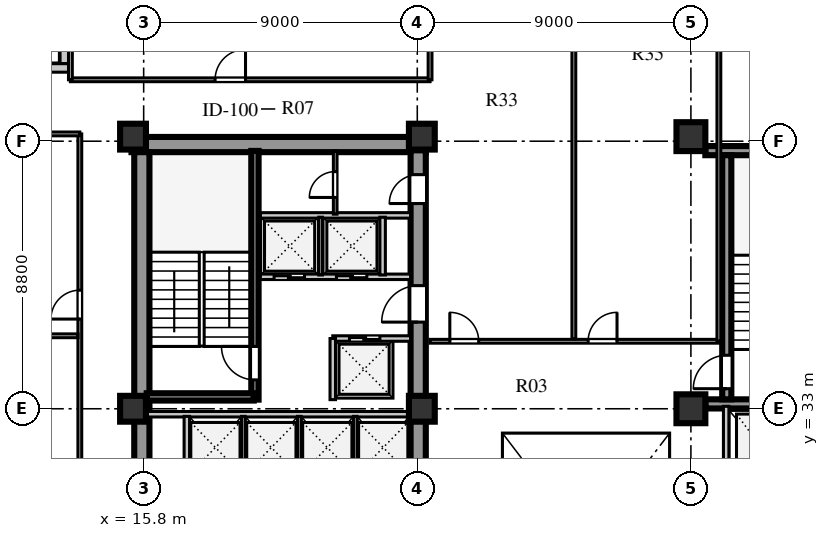
"""IFC4 building model, lengths in metres.
Left out: names, types, materials, properties, quantities, classifications, styles, units other than length and angle.
Written with IfcOpenShell. Run it as: python <this file> out.ifc"""

import sys

from ifc_helpers import new_model, si_unit, direction, frame, frame_2d, origin, origin_2d, place, context, subcontext, project, spatial, rectangle, extrude, element, fill, save


model = new_model("IFC4")
c1 = context("Model", 3, precision=1e-05, world=origin(), true_north=direction((0.0, 1.0)))
c2 = subcontext(c1, "Body", "Model", "MODEL_VIEW")
j1 = project(units=[si_unit("LENGTHUNIT", "METRE"), si_unit("PLANEANGLEUNIT", "RADIAN")], contexts=[c1])
p1 = place(None, origin())
s1 = spatial("IfcSite", under=j1, at=p1, CompositionType="ELEMENT")
p2 = place(p1, origin())
s2 = spatial("IfcBuilding", under=s1, at=p2, CompositionType="ELEMENT")
p3 = place(p2, frame((0.0, 0.0, 165.6)))
s3 = spatial("IfcBuildingStorey", under=s2, at=p3, CompositionType="ELEMENT", Elevation=165.6)
p4 = place(p3, frame((15.4, 41.69, 0.0), z_axis=(0.0, 0.0, 1.0), x_axis=(1.0, 0.0, 0.0)))
e1 = element("IfcWall", 1, at=p4, inside=s3, PredefinedType="SHEAR", context=c2, shape_type="SweptSolid", body=[
    extrude(rectangle(XDim=9.68, YDim=0.5, at=frame_2d((4.84, 0.0))), origin(), (0.0, 0.0, 1.0), 3.6),
])
p5 = place(p3, frame((15.74, 15.81, 0.0), z_axis=(0.0, 0.0, 1.0), x_axis=(0.0, 1.0, 0.0)))
e2 = element("IfcWall", 2, at=p5, inside=s3, PredefinedType="SHEAR", context=c2, shape_type="SweptSolid", body=[
    extrude(rectangle(XDim=25.63, YDim=0.5, at=frame_2d((12.815, 0.0))), origin(), (0.0, 0.0, 1.0), 3.6),
])
p6 = place(p3, frame((24.83, 15.74, 0.0), z_axis=(0.0, 0.0, 1.0), x_axis=(0.0, 1.0, 0.0)))
e3 = element("IfcWall", 3, at=p6, inside=s3, PredefinedType="SHEAR", context=c2, shape_type="SweptSolid", body=[
    extrude(rectangle(XDim=25.76, YDim=0.5, at=frame_2d((12.88, 0.0))), origin(), (0.0, 0.0, 1.0), 3.6),
])
p7 = place(p6, frame((1.61, 0.0, 0.0)))
e4 = element("IfcOpeningElement", 4, at=p7, cuts=e3, PredefinedType="OPENING", context=c2, shape_type="SweptSolid", body=[
    extrude(rectangle(XDim=1.2, YDim=2.1, at=frame_2d((0.6, 1.05))), frame((0.0, 0.26, 0.0), z_axis=(0.0, -1.0, 0.0), x_axis=(1.0, 0.0, 0.0)), (0.0, 0.0, 1.0), 0.52),
])
p8 = place(p6, frame((6.78, 0.0, 0.0)))
e5 = element("IfcOpeningElement", 5, at=p8, cuts=e3, PredefinedType="OPENING", context=c2, shape_type="SweptSolid", body=[
    extrude(rectangle(XDim=0.85, YDim=2.06, at=frame_2d((0.425, 1.03))), frame((0.0, 0.26, 0.0), z_axis=(0.0, -1.0, 0.0), x_axis=(1.0, 0.0, 0.0)), (0.0, 0.0, 1.0), 0.52),
])
p9 = place(p6, frame((12.11, 0.0, 0.0)))
e6 = element("IfcOpeningElement", 6, at=p9, cuts=e3, PredefinedType="OPENING", context=c2, shape_type="SweptSolid", body=[
    extrude(rectangle(XDim=1.5, YDim=2.12, at=frame_2d((0.75, 1.06))), frame((0.0, 0.26, 0.0), z_axis=(0.0, -1.0, 0.0), x_axis=(1.0, 0.0, 0.0)), (0.0, 0.0, 1.0), 0.52),
])
p10 = place(p6, frame((20.11, 0.0, 0.0)))
e7 = element("IfcOpeningElement", 7, at=p10, cuts=e3, PredefinedType="OPENING", context=c2, shape_type="SweptSolid", body=[
    extrude(rectangle(XDim=1.2, YDim=2.12, at=frame_2d((0.6, 1.06))), frame((0.0, 0.26, 0.0), z_axis=(0.0, -1.0, 0.0), x_axis=(1.0, 0.0, 0.0)), (0.0, 0.0, 1.0), 0.52),
])
p11 = place(p6, frame((24.01, 0.0, 0.0)))
e8 = element("IfcOpeningElement", 8, at=p11, cuts=e3, PredefinedType="OPENING", context=c2, shape_type="SweptSolid", body=[
    extrude(rectangle(XDim=0.95, YDim=2.1, at=frame_2d((0.475, 1.05))), frame((0.0, 0.26, 0.0), z_axis=(0.0, -1.0, 0.0), x_axis=(1.0, 0.0, 0.0)), (0.0, 0.0, 1.0), 0.52),
])
for number, where, z_axis, x_axis in (
    (9, (34.275, 33.16, 0.0), (0.0, 0.0, 1.0), (1.0, 0.0, 0.0)),
    (10, (34.275, 41.49, 0.0), (0.0, 0.0, 1.0), (1.0, 0.0, 0.0)),
):
    element("IfcWall", number, at=place(p3, frame(where, z_axis=z_axis, x_axis=x_axis)), inside=s3, PredefinedType="SHEAR", context=c2, shape_type="SweptSolid", body=[
        extrude(rectangle(XDim=4.595, YDim=0.3, at=frame_2d((2.298, 0.0))), origin(), (0.0, 0.0, 1.0), 3.6),
    ])
p12 = place(p3, frame((34.98, 33.31, 0.0), z_axis=(0.0, 0.0, 1.0), x_axis=(0.0, 1.0, 0.0)))
e11 = element("IfcWall", 11, at=p12, inside=s3, PredefinedType="SHEAR", context=c2, shape_type="SweptSolid", body=[
    extrude(rectangle(XDim=8.03, YDim=0.3, at=frame_2d((4.015, 0.0))), origin(), (0.0, 0.0, 1.0), 3.6),
])
p13 = place(p12, frame((0.35, 0.0, 0.0)))
e12 = element("IfcOpeningElement", 12, at=p13, cuts=e11, PredefinedType="OPENING", context=c2, shape_type="SweptSolid", body=[
    extrude(rectangle(XDim=1.1, YDim=2.1, at=frame_2d((0.55, 1.05))), frame((0.0, 0.16, 0.0), z_axis=(0.0, -1.0, 0.0), x_axis=(1.0, 0.0, 0.0)), (0.0, 0.0, 1.0), 0.32),
])
for number, where, z_axis, x_axis in (
    (13, (15.45, 33.0, 0.0), (0.0, 0.0, 1.0), (1.0, 0.0, 0.0)),
    (14, (15.45, 41.95, 0.0), (0.0, 0.0, 1.0), (1.0, 0.0, 0.0)),
    (15, (24.95, 33.0, 0.0), (0.0, 0.0, 1.0), (1.0, 0.0, 0.0)),
    (16, (24.95, 41.95, 0.0), (0.0, 0.0, 1.0), (1.0, 0.0, 0.0)),
):
    element("IfcColumn", number, at=place(p3, frame(where, z_axis=z_axis, x_axis=x_axis)), inside=s3, PredefinedType="COLUMN", context=c2, shape_type="SweptSolid", body=[
        extrude(rectangle(XDim=0.85, YDim=0.85, at=origin_2d()), origin(), (0.0, 0.0, 1.0), 3.6),
    ])
for number, where, z_axis, x_axis in (
    (17, (33.8, 33.0, 0.0), (0.0, 0.0, 1.0), (1.0, 0.0, 0.0)),
    (18, (33.8, 41.95, 0.0), (0.0, 0.0, 1.0), (1.0, 0.0, 0.0)),
):
    element("IfcColumn", number, at=place(p3, frame(where, z_axis=z_axis, x_axis=x_axis)), inside=s3, PredefinedType="COLUMN", context=c2, shape_type="SweptSolid", body=[
        extrude(rectangle(XDim=0.95, YDim=0.95, at=origin_2d()), origin(), (0.0, 0.0, 1.0), 3.6),
    ])
p14 = place(p3, frame((13.19, 49.32, 0.0), z_axis=(0.0, 0.0, 1.0), x_axis=(0.0, -1.0, 0.0)))
e19 = element("IfcWall", 19, at=p14, inside=s3, PredefinedType="STANDARD", context=c2, shape_type="SweptSolid", body=[
    extrude(rectangle(XDim=4.97, YDim=0.28, at=frame_2d((2.485, 0.0))), origin(), (0.0, 0.0, 1.0), 3.6),
])
p15 = place(p3, frame((13.33, 44.21, 0.0), z_axis=(0.0, 0.0, 1.0), x_axis=(-1.0, 0.0, 0.0)))
e20 = element("IfcWall", 20, at=p15, inside=s3, PredefinedType="STANDARD", context=c2, shape_type="SweptSolid", body=[
    extrude(rectangle(XDim=5.53, YDim=0.28, at=frame_2d((2.765, 0.0))), origin(), (0.0, 0.0, 1.0), 3.6),
])
p16 = place(p3, frame((15.9, 32.82, 0.0), z_axis=(0.0, 0.0, 1.0), x_axis=(1.0, 0.0, 0.0)))
e21 = element("IfcWall", 21, at=p16, inside=s3, PredefinedType="SOLIDWALL", context=c2, shape_type="SweptSolid", body=[
    extrude(rectangle(XDim=8.68, YDim=0.18, at=frame_2d((4.34, 0.0))), origin(), (0.0, 0.0, 1.0), 2.95),
])
p17 = place(p3, frame((17.22, 30.7, 0.0), z_axis=(0.0, 0.0, 1.0), x_axis=(0.0, 1.0, 0.0)))
e22 = element("IfcWall", 22, at=p17, inside=s3, PredefinedType="SOLIDWALL", context=c2, shape_type="SweptSolid", body=[
    extrude(rectangle(XDim=2.05, YDim=0.18, at=frame_2d((1.025, 0.0))), origin(), (0.0, 0.0, 1.0), 3.6),
])
for number, where, z_axis, x_axis in (
    (23, (19.08, 30.7, 0.0), (0.0, 0.0, 1.0), (0.0, 1.0, 0.0)),
    (24, (20.92, 30.7, 0.0), (0.0, 0.0, 1.0), (0.0, 1.0, 0.0)),
    (25, (22.76, 30.7, 0.0), (0.0, 0.0, 1.0), (0.0, 1.0, 0.0)),
):
    element("IfcWall", number, at=place(p3, frame(where, z_axis=z_axis, x_axis=x_axis)), inside=s3, PredefinedType="PARTITIONING", context=c2, shape_type="SweptSolid", body=[
        extrude(rectangle(XDim=2.05, YDim=0.12, at=frame_2d((1.025, 0.0))), origin(), (0.0, 0.0, 1.0), 3.6),
    ])
p18 = place(p3, frame((19.46, 33.3, 0.0), z_axis=(0.0, 0.0, 1.0), x_axis=(0.0, 1.0, 0.0)))
e26 = element("IfcWall", 26, at=p18, inside=s3, PredefinedType="SHEAR", context=c2, shape_type="SweptSolid", body=[
    extrude(rectangle(XDim=8.18, YDim=0.24, at=frame_2d((4.09, 0.0))), origin(), (0.0, 0.0, 1.0), 3.85),
])
p19 = place(p18, frame((0.65, 0.0, 0.0)))
e27 = element("IfcOpeningElement", 27, at=p19, cuts=e26, PredefinedType="OPENING", context=c2, shape_type="SweptSolid", body=[
    extrude(rectangle(XDim=1.1, YDim=2.1, at=frame_2d((0.55, 1.05))), frame((0.0, 0.13, 0.0), z_axis=(0.0, -1.0, 0.0), x_axis=(1.0, 0.0, 0.0)), (0.0, 0.0, 1.0), 0.26),
])
p20 = place(p3, frame((15.9, 33.39, 0.0), z_axis=(0.0, 0.0, 1.0), x_axis=(1.0, 0.0, 0.0)))
e28 = element("IfcWall", 28, at=p20, inside=s3, PredefinedType="SHEAR", context=c2, shape_type="SweptSolid", body=[
    extrude(rectangle(XDim=3.52, YDim=0.24, at=frame_2d((1.76, 0.0))), origin(), (0.0, 0.0, 1.0), 3.85),
])
p21 = place(p3, frame((22.02, 35.31, 0.0), z_axis=(0.0, 0.0, 1.0), x_axis=(1.0, 0.0, 0.0)))
e29 = element("IfcWall", 29, at=p21, inside=s3, PredefinedType="SOLIDWALL", context=c2, shape_type="SweptSolid", body=[
    extrude(rectangle(XDim=2.56, YDim=0.18, at=frame_2d((1.28, 0.0))), origin(), (0.0, 0.0, 1.0), 3.6),
])
p22 = place(p21, frame((0.55, 0.0, 0.0)))
e30 = element("IfcOpeningElement", 30, at=p22, cuts=e29, PredefinedType="OPENING", context=c2, shape_type="SweptSolid", body=[
    extrude(rectangle(XDim=1.0, YDim=2.1, at=frame_2d((0.5, 1.05))), frame((0.0, 0.1, 0.0), z_axis=(0.0, -1.0, 0.0), x_axis=(1.0, 0.0, 0.0)), (0.0, 0.0, 1.0), 0.2),
])
p23 = place(p3, frame((22.02, 33.3, 0.0), z_axis=(0.0, 0.0, 1.0), x_axis=(0.0, 1.0, 0.0)))
e31 = element("IfcWall", 31, at=p23, inside=s3, PredefinedType="SOLIDWALL", context=c2, shape_type="SweptSolid", body=[
    extrude(rectangle(XDim=2.01, YDim=0.18, at=frame_2d((1.005, 0.0))), origin(), (0.0, 0.0, 1.0), 3.6),
])
p24 = place(p3, frame((19.64, 37.34, 0.0), z_axis=(0.0, 0.0, 1.0), x_axis=(1.0, 0.0, 0.0)))
e32 = element("IfcWall", 32, at=p24, inside=s3, PredefinedType="SOLIDWALL", context=c2, shape_type="SweptSolid", body=[
    extrude(rectangle(XDim=4.94, YDim=0.18, at=frame_2d((2.47, 0.0))), origin(), (0.0, 0.0, 1.0), 3.6),
])
p25 = place(p24, frame((0.45, 0.0, 0.0)))
e33 = element("IfcOpeningElement", 33, at=p25, cuts=e32, PredefinedType="OPENING", context=c2, shape_type="SweptSolid", body=[
    extrude(rectangle(XDim=1.0, YDim=2.1, at=frame_2d((0.5, 1.05))), frame((0.0, 0.1, 0.0), z_axis=(0.0, -1.0, 0.0), x_axis=(1.0, 0.0, 0.0)), (0.0, 0.0, 1.0), 0.2),
])
p26 = place(p24, frame((2.5, 0.0, 0.0)))
e34 = element("IfcOpeningElement", 34, at=p26, cuts=e32, PredefinedType="OPENING", context=c2, shape_type="SweptSolid", body=[
    extrude(rectangle(XDim=1.0, YDim=2.1, at=frame_2d((0.5, 1.05))), frame((0.0, 0.1, 0.0), z_axis=(0.0, -1.0, 0.0), x_axis=(1.0, 0.0, 0.0)), (0.0, 0.0, 1.0), 0.2),
])
p27 = place(p3, frame((19.64, 39.36, 0.0), z_axis=(0.0, 0.0, 1.0), x_axis=(1.0, 0.0, 0.0)))
e35 = element("IfcWall", 35, at=p27, inside=s3, PredefinedType="SOLIDWALL", context=c2, shape_type="SweptSolid", body=[
    extrude(rectangle(XDim=4.94, YDim=0.18, at=frame_2d((2.47, 0.0))), origin(), (0.0, 0.0, 1.0), 3.6),
])
p28 = place(p3, frame((21.62, 37.4, 0.0), z_axis=(0.0, 0.0, 1.0), x_axis=(0.0, 1.0, 0.0)))
e36 = element("IfcWall", 36, at=p28, inside=s3, PredefinedType="PARTITIONING", context=c2, shape_type="SweptSolid", body=[
    extrude(rectangle(XDim=1.9, YDim=0.12, at=frame_2d((0.95, 0.0))), origin(), (0.0, 0.0, 1.0), 3.6),
])
p29 = place(p3, frame((23.66, 37.4, 0.0), z_axis=(0.0, 0.0, 1.0), x_axis=(0.0, 1.0, 0.0)))
e37 = element("IfcWall", 37, at=p29, inside=s3, PredefinedType="SOLIDWALL", context=c2, shape_type="SweptSolid", body=[
    extrude(rectangle(XDim=1.9, YDim=0.18, at=frame_2d((0.95, 0.0))), origin(), (0.0, 0.0, 1.0), 3.6),
])
p30 = place(p3, frame((22.1, 39.4, 0.0), z_axis=(0.0, 0.0, 1.0), x_axis=(0.0, 1.0, 0.0)))
e38 = element("IfcWall", 38, at=p30, inside=s3, PredefinedType="PARTITIONING", context=c2, shape_type="SweptSolid", body=[
    extrude(rectangle(XDim=2.08, YDim=0.12, at=frame_2d((1.04, 0.0))), origin(), (0.0, 0.0, 1.0), 3.6),
])
p31 = place(p30, frame((0.55, 0.0, 0.0)))
e39 = element("IfcOpeningElement", 39, at=p31, cuts=e38, PredefinedType="OPENING", context=c2, shape_type="SweptSolid", body=[
    extrude(rectangle(XDim=0.85, YDim=2.06, at=frame_2d((0.425, 1.03))), frame((0.0, 0.07, 0.0), z_axis=(0.0, -1.0, 0.0), x_axis=(1.0, 0.0, 0.0)), (0.0, 0.0, 1.0), 0.14),
])
p32 = place(p3, frame((34.96, 28.86, 0.0), z_axis=(0.0, 0.0, 1.0), x_axis=(0.0, 1.0, 0.0)))
e40 = element("IfcWall", 40, at=p32, inside=s3, PredefinedType="SOLIDWALL", context=c2, shape_type="SweptSolid", body=[
    extrude(rectangle(XDim=4.22, YDim=0.18, at=frame_2d((2.11, 0.0))), origin(), (0.0, 0.0, 1.0), 3.6),
])
p33 = place(p3, frame((25.22, 35.22, 0.0), z_axis=(0.0, 0.0, 1.0), x_axis=(1.0, 0.0, 0.0)))
e41 = element("IfcWall", 41, at=p33, inside=s3, PredefinedType="PLUMBINGWALL", context=c2, shape_type="SweptSolid", body=[
    extrude(rectangle(XDim=9.5, YDim=0.125, at=frame_2d((4.75, 0.0))), origin(), (0.0, 0.0, 1.0), 3.6),
])
p34 = place(p33, frame((0.65, 0.0, 0.0)))
e42 = element("IfcOpeningElement", 42, at=p34, cuts=e41, PredefinedType="OPENING", context=c2, shape_type="SweptSolid", body=[
    extrude(rectangle(XDim=0.95, YDim=2.1, at=frame_2d((0.475, 1.05))), frame((0.0, 0.073, 0.0), z_axis=(0.0, -1.0, 0.0), x_axis=(1.0, 0.0, 0.0)), (0.0, 0.0, 1.0), 0.145),
])
p35 = place(p33, frame((5.2, 0.0, 0.0)))
e43 = element("IfcOpeningElement", 43, at=p35, cuts=e41, PredefinedType="OPENING", context=c2, shape_type="SweptSolid", body=[
    extrude(rectangle(XDim=0.95, YDim=2.1, at=frame_2d((0.475, 1.05))), frame((0.0, 0.073, 0.0), z_axis=(0.0, -1.0, 0.0), x_axis=(1.0, 0.0, 0.0)), (0.0, 0.0, 1.0), 0.145),
])
p36 = place(p3, frame((13.7, 15.16, 0.0), z_axis=(0.0, 0.0, 1.0), x_axis=(0.0, 1.0, 0.0)))
e44 = element("IfcWall", 44, at=p36, inside=s3, PredefinedType="PLUMBINGWALL", context=c2, shape_type="SweptSolid", body=[
    extrude(rectangle(XDim=26.88, YDim=0.125, at=frame_2d((13.44, 0.0))), origin(), (0.0, 0.0, 1.0), 3.6),
])
p37 = place(p36, frame((0.91, 0.0, 0.0)))
e45 = element("IfcOpeningElement", 45, at=p37, cuts=e44, PredefinedType="OPENING", context=c2, shape_type="SweptSolid", body=[
    extrude(rectangle(XDim=0.95, YDim=2.1, at=frame_2d((0.475, 1.05))), frame((0.0, 0.073, 0.0), z_axis=(0.0, -1.0, 0.0), x_axis=(1.0, 0.0, 0.0)), (0.0, 0.0, 1.0), 0.145),
])
p38 = place(p36, frame((6.99, 0.0, 0.0)))
e46 = element("IfcOpeningElement", 46, at=p38, cuts=e44, PredefinedType="OPENING", context=c2, shape_type="SweptSolid", body=[
    extrude(rectangle(XDim=0.95, YDim=2.1, at=frame_2d((0.475, 1.05))), frame((0.0, 0.073, 0.0), z_axis=(0.0, -1.0, 0.0), x_axis=(1.0, 0.0, 0.0)), (0.0, 0.0, 1.0), 0.145),
])
p39 = place(p36, frame((14.19, 0.0, 0.0)))
e47 = element("IfcOpeningElement", 47, at=p39, cuts=e44, PredefinedType="OPENING", context=c2, shape_type="SweptSolid", body=[
    extrude(rectangle(XDim=0.95, YDim=2.1, at=frame_2d((0.475, 1.05))), frame((0.0, 0.073, 0.0), z_axis=(0.0, -1.0, 0.0), x_axis=(1.0, 0.0, 0.0)), (0.0, 0.0, 1.0), 0.145),
])
p40 = place(p36, frame((20.79, 0.0, 0.0)))
e48 = element("IfcOpeningElement", 48, at=p40, cuts=e44, PredefinedType="OPENING", context=c2, shape_type="SweptSolid", body=[
    extrude(rectangle(XDim=0.95, YDim=2.1, at=frame_2d((0.475, 1.05))), frame((0.0, 0.073, 0.0), z_axis=(0.0, -1.0, 0.0), x_axis=(1.0, 0.0, 0.0)), (0.0, 0.0, 1.0), 0.145),
])
p41 = place(p3, frame((8.08, 42.04, 0.0), z_axis=(0.0, 0.0, 1.0), x_axis=(1.0, 0.0, 0.0)))
e49 = element("IfcWall", 49, at=p41, inside=s3, PredefinedType="PLUMBINGWALL", context=c2, shape_type="SweptSolid", body=[
    extrude(rectangle(XDim=5.62, YDim=0.125, at=frame_2d((2.81, 0.0))), origin(), (0.0, 0.0, 1.0), 3.15),
])
p42 = place(p3, frame((13.39, 43.82, 0.0), z_axis=(0.0, 0.0, 1.0), x_axis=(1.0, 0.0, 0.0)))
e50 = element("IfcWall", 50, at=p42, inside=s3, PredefinedType="PLUMBINGWALL", context=c2, shape_type="SweptSolid", body=[
    extrude(rectangle(XDim=11.83, YDim=0.125, at=frame_2d((5.915, 0.0))), origin(), (0.0, 0.0, 1.0), 3.6),
])
p43 = place(p42, frame((4.76, 0.0, 0.0)))
e51 = element("IfcOpeningElement", 51, at=p43, cuts=e50, PredefinedType="OPENING", context=c2, shape_type="SweptSolid", body=[
    extrude(rectangle(XDim=1.0, YDim=2.08, at=frame_2d((0.5, 1.04))), frame((0.0, 0.073, 0.0), z_axis=(0.0, -1.0, 0.0), x_axis=(1.0, 0.0, 0.0)), (0.0, 0.0, 1.0), 0.145),
])
p44 = place(p3, frame((13.39, 43.82, 0.0), z_axis=(0.0, 0.0, 1.0), x_axis=(0.0, 1.0, 0.0)))
e52 = element("IfcWall", 52, at=p44, inside=s3, PredefinedType="PLUMBINGWALL", context=c2, shape_type="SweptSolid", body=[
    extrude(rectangle(XDim=5.5, YDim=0.125, at=frame_2d((2.75, 0.0))), origin(), (0.0, 0.0, 1.0), 3.6),
])
p45 = place(p3, frame((25.22, 43.82, 0.0), z_axis=(0.0, 0.0, 1.0), x_axis=(0.0, 1.0, 0.0)))
e53 = element("IfcWall", 53, at=p45, inside=s3, PredefinedType="PLUMBINGWALL", context=c2, shape_type="SweptSolid", body=[
    extrude(rectangle(XDim=5.5, YDim=0.125, at=frame_2d((2.75, 0.0))), origin(), (0.0, 0.0, 1.0), 3.15),
])
p46 = place(p3, frame((8.08, 35.4, 0.0), z_axis=(0.0, 0.0, 1.0), x_axis=(1.0, 0.0, 0.0)))
e54 = element("IfcWall", 54, at=p46, inside=s3, PredefinedType="PLUMBINGWALL", context=c2, shape_type="SweptSolid", body=[
    extrude(rectangle(XDim=5.56, YDim=0.125, at=frame_2d((2.78, 0.0))), origin(), (0.0, 0.0, 1.0), 3.6),
])
p47 = place(p3, frame((34.72, 35.22, 0.0), z_axis=(0.0, 0.0, 1.0), x_axis=(0.0, 1.0, 0.0)))
e55 = element("IfcWall", 55, at=p47, inside=s3, PredefinedType="PLUMBINGWALL", context=c2, shape_type="SweptSolid", body=[
    extrude(rectangle(XDim=14.1, YDim=0.125, at=frame_2d((7.05, 0.0))), origin(), (0.0, 0.0, 1.0), 3.6),
])
p48 = place(p3, frame((29.95, 35.3, 0.0), z_axis=(0.0, 0.0, 1.0), x_axis=(0.0, 1.0, 0.0)))
e56 = element("IfcWall", 56, at=p48, inside=s3, PredefinedType="PLUMBINGWALL", context=c2, shape_type="SweptSolid", body=[
    extrude(rectangle(XDim=14.02, YDim=0.125, at=frame_2d((7.01, 0.0))), origin(), (0.0, 0.0, 1.0), 3.6),
])
p49 = place(p19, origin())
e57 = element("IfcDoor", 57, at=p49, inside=s3, OperationType="SINGLE_SWING_RIGHT", PredefinedType="DOOR", context=c2, shape_type="SweptSolid", body=[
    extrude(rectangle(XDim=1.1, YDim=2.1, at=frame_2d((0.55, 1.05))), frame((0.0, 0.025, 0.0), z_axis=(0.0, -1.0, 0.0), x_axis=(1.0, 0.0, 0.0)), (0.0, 0.0, 1.0), 0.05),
])
fill(e27, e57)
p50 = place(p10, frame((1.2, 0.0, 0.0), z_axis=(0.0, 0.0, 1.0), x_axis=(-1.0, 0.0, 0.0)))
e58 = element("IfcDoor", 58, at=p50, inside=s3, OperationType="SINGLE_SWING_RIGHT", PredefinedType="DOOR", context=c2, shape_type="SweptSolid", body=[
    extrude(rectangle(XDim=1.2, YDim=2.12, at=frame_2d((0.6, 1.06))), frame((0.0, 0.025, 0.0), z_axis=(0.0, -1.0, 0.0), x_axis=(1.0, 0.0, 0.0)), (0.0, 0.0, 1.0), 0.05),
])
fill(e7, e58)
p51 = place(p25, frame((1.0, 0.0, 0.0), z_axis=(0.0, 0.0, 1.0), x_axis=(-1.0, 0.0, 0.0)))
e59 = element("IfcDoor", 59, at=p51, inside=s3, OperationType="DOUBLE_DOOR_SLIDING", PredefinedType="DOOR", context=c2, shape_type="SweptSolid", body=[
    extrude(rectangle(XDim=1.0, YDim=2.1, at=frame_2d((0.5, 1.05))), frame((0.0, 0.025, 0.0), z_axis=(0.0, -1.0, 0.0), x_axis=(1.0, 0.0, 0.0)), (0.0, 0.0, 1.0), 0.05),
])
fill(e33, e59)
p52 = place(p26, frame((1.0, 0.0, 0.0), z_axis=(0.0, 0.0, 1.0), x_axis=(-1.0, 0.0, 0.0)))
e60 = element("IfcDoor", 60, at=p52, inside=s3, OperationType="DOUBLE_DOOR_SLIDING", PredefinedType="DOOR", context=c2, shape_type="SweptSolid", body=[
    extrude(rectangle(XDim=1.0, YDim=2.1, at=frame_2d((0.5, 1.05))), frame((0.0, 0.025, 0.0), z_axis=(0.0, -1.0, 0.0), x_axis=(1.0, 0.0, 0.0)), (0.0, 0.0, 1.0), 0.05),
])
fill(e34, e60)
p53 = place(p22, origin())
e61 = element("IfcDoor", 61, at=p53, inside=s3, OperationType="DOUBLE_DOOR_SLIDING", PredefinedType="DOOR", context=c2, shape_type="SweptSolid", body=[
    extrude(rectangle(XDim=1.0, YDim=2.1, at=frame_2d((0.5, 1.05))), frame((0.0, 0.025, 0.0), z_axis=(0.0, -1.0, 0.0), x_axis=(1.0, 0.0, 0.0)), (0.0, 0.0, 1.0), 0.05),
])
fill(e30, e61)
p54 = place(p31, origin())
e62 = element("IfcDoor", 62, at=p54, inside=s3, OperationType="SINGLE_SWING_LEFT", PredefinedType="DOOR", context=c2, shape_type="SweptSolid", body=[
    extrude(rectangle(XDim=0.85, YDim=2.06, at=frame_2d((0.425, 1.03))), frame((0.0, 0.025, 0.0), z_axis=(0.0, -1.0, 0.0), x_axis=(1.0, 0.0, 0.0)), (0.0, 0.0, 1.0), 0.05),
])
fill(e39, e62)
p55 = place(p11, frame((0.95, 0.0, 0.0), z_axis=(0.0, 0.0, 1.0), x_axis=(-1.0, 0.0, 0.0)))
e63 = element("IfcDoor", 63, at=p55, inside=s3, OperationType="SINGLE_SWING_RIGHT", PredefinedType="DOOR", context=c2, shape_type="SweptSolid", body=[
    extrude(rectangle(XDim=0.95, YDim=2.1, at=frame_2d((0.475, 1.05))), frame((0.0, 0.025, 0.0), z_axis=(0.0, -1.0, 0.0), x_axis=(1.0, 0.0, 0.0)), (0.0, 0.0, 1.0), 0.05),
])
fill(e8, e63)
p56 = place(p13, origin())
e64 = element("IfcDoor", 64, at=p56, inside=s3, OperationType="SINGLE_SWING_LEFT", PredefinedType="DOOR", context=c2, shape_type="SweptSolid", body=[
    extrude(rectangle(XDim=1.1, YDim=2.1, at=frame_2d((0.55, 1.05))), frame((0.0, 0.025, 0.0), z_axis=(0.0, -1.0, 0.0), x_axis=(1.0, 0.0, 0.0)), (0.0, 0.0, 1.0), 0.05),
])
fill(e12, e64)
p57 = place(p43, origin())
e65 = element("IfcDoor", 65, at=p57, inside=s3, OperationType="SINGLE_SWING_RIGHT", PredefinedType="DOOR", context=c2, shape_type="SweptSolid", body=[
    extrude(rectangle(XDim=1.0, YDim=2.08, at=frame_2d((0.5, 1.04))), frame((0.0, 0.025, 0.0), z_axis=(0.0, -1.0, 0.0), x_axis=(1.0, 0.0, 0.0)), (0.0, 0.0, 1.0), 0.05),
])
fill(e51, e65)
p58 = place(p40, origin())
e66 = element("IfcDoor", 66, at=p58, inside=s3, OperationType="SINGLE_SWING_LEFT", PredefinedType="DOOR", context=c2, shape_type="SweptSolid", body=[
    extrude(rectangle(XDim=0.95, YDim=2.1, at=frame_2d((0.475, 1.05))), frame((0.0, 0.025, 0.0), z_axis=(0.0, -1.0, 0.0), x_axis=(1.0, 0.0, 0.0)), (0.0, 0.0, 1.0), 0.05),
])
fill(e48, e66)
p59 = place(p34, origin())
e67 = element("IfcDoor", 67, at=p59, inside=s3, OperationType="SINGLE_SWING_LEFT", PredefinedType="DOOR", context=c2, shape_type="SweptSolid", body=[
    extrude(rectangle(XDim=0.95, YDim=2.1, at=frame_2d((0.475, 1.05))), frame((0.0, 0.025, 0.0), z_axis=(0.0, -1.0, 0.0), x_axis=(1.0, 0.0, 0.0)), (0.0, 0.0, 1.0), 0.05),
])
fill(e42, e67)
p60 = place(p35, origin())
e68 = element("IfcDoor", 68, at=p60, inside=s3, OperationType="SINGLE_SWING_RIGHT", PredefinedType="DOOR", context=c2, shape_type="SweptSolid", body=[
    extrude(rectangle(XDim=0.95, YDim=2.1, at=frame_2d((0.475, 1.05))), frame((0.0, 0.025, 0.0), z_axis=(0.0, -1.0, 0.0), x_axis=(1.0, 0.0, 0.0)), (0.0, 0.0, 1.0), 0.05),
])
fill(e43, e68)
save(model, sys.argv[1])
